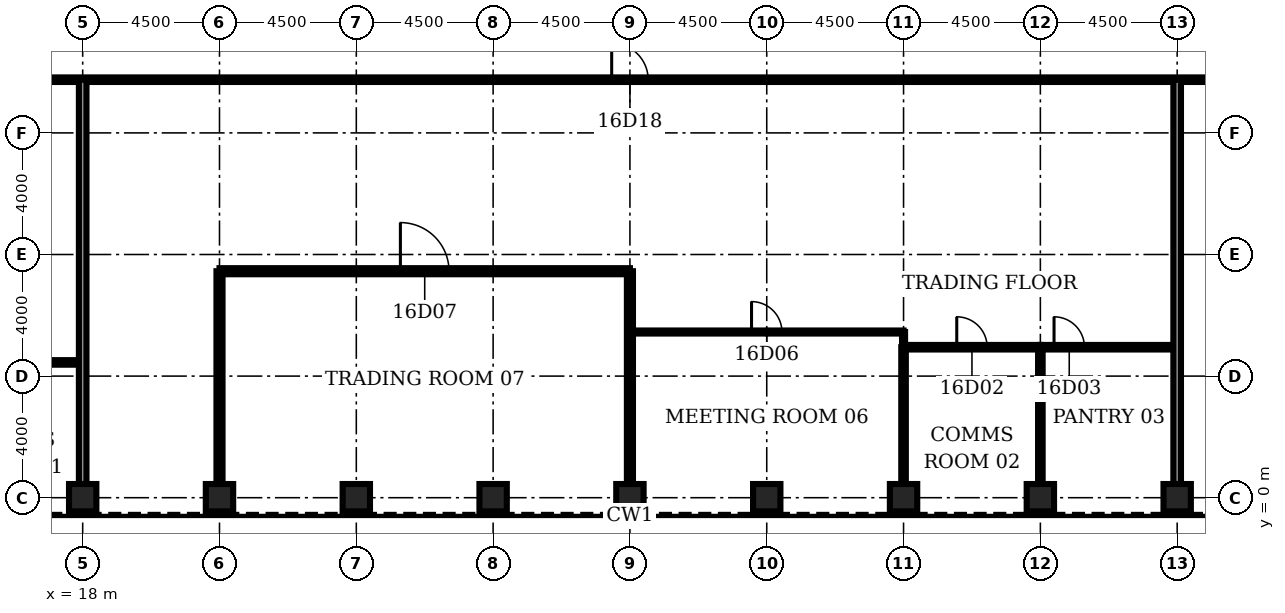
"""IFC4 building model, lengths in metres.
Left out: names, types, materials, properties, quantities, classifications, styles, units other than length and angle.
Written with IfcOpenShell. Run it as: python <this file> out.ifc"""

import sys

from ifc_helpers import new_model, si_unit, direction, frame, frame_2d, origin, origin_2d, place, context, subcontext, project, spatial, rectangle, hollow_rectangle, extrude, element, fill, save


model = new_model("IFC4")
c1 = context("Model", 3, precision=1e-05, world=origin(), true_north=direction((0.0, 1.0)))
c2 = subcontext(c1, "Body", "Model", "MODEL_VIEW")
j1 = project(units=[si_unit("LENGTHUNIT", "METRE"), si_unit("PLANEANGLEUNIT", "RADIAN")], contexts=[c1])
p1 = place(None, origin())
s1 = spatial("IfcSite", under=j1, at=p1, CompositionType="ELEMENT")
p2 = place(p1, origin())
s2 = spatial("IfcBuilding", under=s1, at=p2, CompositionType="ELEMENT")
p3 = place(p2, frame((0.0, 0.0, 77.0)))
s3 = spatial("IfcBuildingStorey", under=s2, at=p3, CompositionType="ELEMENT", Elevation=77.0)
for number, where, z_axis, x_axis in (
    (1, (18.0, 0.0, 0.0), (0.0, 0.0, 1.0), (0.0, 1.0, 0.0)),
    (2, (22.5, 0.0, 0.0), (0.0, 0.0, 1.0), (0.0, 1.0, 0.0)),
    (3, (27.0, 0.0, 0.0), (0.0, 0.0, 1.0), (0.0, 1.0, 0.0)),
    (4, (31.5, 0.0, 0.0), (0.0, 0.0, 1.0), (0.0, 1.0, 0.0)),
    (5, (36.0, 0.0, 0.0), (0.0, 0.0, 1.0), (0.0, 1.0, 0.0)),
    (6, (40.5, 0.0, 0.0), (0.0, 0.0, 1.0), (0.0, 1.0, 0.0)),
    (7, (45.0, 0.0, 0.0), (0.0, 0.0, 1.0), (0.0, 1.0, 0.0)),
    (8, (49.5, 0.0, 0.0), (0.0, 0.0, 1.0), (0.0, 1.0, 0.0)),
    (9, (54.0, 0.0, 0.0), (0.0, 0.0, 1.0), (0.0, 1.0, 0.0)),
):
    element("IfcColumn", number, at=place(p3, frame(where, z_axis=z_axis, x_axis=x_axis)), inside=s3, PredefinedType="COLUMN", context=c2, shape_type="SweptSolid", body=[
        extrude(hollow_rectangle(XDim=0.9, YDim=0.9, WallThickness=0.11, at=origin_2d()), origin(), (0.0, 0.0, 1.0), 4.5),
    ])
p4 = place(p3, frame((13.5, 4.45, 0.0), z_axis=(0.0, 0.0, 1.0), x_axis=(1.0, 0.0, 0.0)))
e10 = element("IfcWall", 10, at=p4, inside=s3, PredefinedType="PARTITIONING", context=c2, shape_type="SweptSolid", body=[
    extrude(rectangle(XDim=4.5, YDim=0.15, at=frame_2d((2.25, 0.0))), origin(), (0.0, 0.0, 1.0), 3.0),
])
p5 = place(p4, frame((1.75, 0.0, 0.0)))
e11 = element("IfcOpeningElement", 11, at=p5, cuts=e10, PredefinedType="OPENING", context=c2, shape_type="SweptSolid", body=[
    extrude(rectangle(XDim=1.0, YDim=2.1, at=frame_2d((0.5, 1.05))), frame((0.0, 0.085, 0.0), z_axis=(0.0, -1.0, 0.0), x_axis=(1.0, 0.0, 0.0)), (0.0, 0.0, 1.0), 0.17),
])
p6 = place(p3, frame((45.0, 4.95, 0.0), z_axis=(0.0, 0.0, 1.0), x_axis=(1.0, 0.0, 0.0)))
e12 = element("IfcWall", 12, at=p6, inside=s3, PredefinedType="PARTITIONING", context=c2, shape_type="SweptSolid", body=[
    extrude(rectangle(XDim=4.5, YDim=0.15, at=frame_2d((2.25, 0.0))), origin(), (0.0, 0.0, 1.0), 3.0),
])
p7 = place(p6, frame((1.75, 0.0, 0.0)))
e13 = element("IfcOpeningElement", 13, at=p7, cuts=e12, PredefinedType="OPENING", context=c2, shape_type="SweptSolid", body=[
    extrude(rectangle(XDim=1.0, YDim=2.1, at=frame_2d((0.5, 1.05))), frame((0.0, 0.085, 0.0), z_axis=(0.0, -1.0, 0.0), x_axis=(1.0, 0.0, 0.0)), (0.0, 0.0, 1.0), 0.17),
])
p8 = place(p3, frame((49.5, 4.95, 0.0), z_axis=(0.0, 0.0, 1.0), x_axis=(1.0, 0.0, 0.0)))
e14 = element("IfcWall", 14, at=p8, inside=s3, PredefinedType="PARTITIONING", context=c2, shape_type="SweptSolid", body=[
    extrude(rectangle(XDim=4.5, YDim=0.15, at=frame_2d((2.25, 0.0))), origin(), (0.0, 0.0, 1.0), 3.0),
])
p9 = place(p8, frame((0.45, 0.0, 0.0)))
e15 = element("IfcOpeningElement", 15, at=p9, cuts=e14, PredefinedType="OPENING", context=c2, shape_type="SweptSolid", body=[
    extrude(rectangle(XDim=1.0, YDim=2.1, at=frame_2d((0.5, 1.05))), frame((0.0, 0.085, 0.0), z_axis=(0.0, -1.0, 0.0), x_axis=(1.0, 0.0, 0.0)), (0.0, 0.0, 1.0), 0.17),
])
p10 = place(p3, frame((36.0, 5.45, 0.0), z_axis=(0.0, 0.0, 1.0), x_axis=(1.0, 0.0, 0.0)))
e16 = element("IfcWall", 16, at=p10, inside=s3, PredefinedType="PARTITIONING", context=c2, shape_type="SweptSolid", body=[
    extrude(rectangle(XDim=9.0, YDim=0.1, at=frame_2d((4.5, 0.0))), origin(), (0.0, 0.0, 1.0), 3.0),
])
p11 = place(p10, frame((4.0, 0.0, 0.0)))
e17 = element("IfcOpeningElement", 17, at=p11, cuts=e16, PredefinedType="OPENING", context=c2, shape_type="SweptSolid", body=[
    extrude(rectangle(XDim=1.0, YDim=2.1, at=frame_2d((0.5, 1.05))), frame((0.0, 0.06, 0.0), z_axis=(0.0, -1.0, 0.0), x_axis=(1.0, 0.0, 0.0)), (0.0, 0.0, 1.0), 0.12),
])
p12 = place(p3, frame((22.5, 7.45, 0.0), z_axis=(0.0, 0.0, 1.0), x_axis=(1.0, 0.0, 0.0)))
e18 = element("IfcWall", 18, at=p12, inside=s3, PredefinedType="PARTITIONING", context=c2, shape_type="SweptSolid", body=[
    extrude(rectangle(XDim=13.5, YDim=0.2, at=frame_2d((6.75, 0.0))), origin(), (0.0, 0.0, 1.0), 3.0),
])
p13 = place(p12, frame((5.95, 0.0, 0.0)))
e19 = element("IfcOpeningElement", 19, at=p13, cuts=e18, PredefinedType="OPENING", context=c2, shape_type="SweptSolid", body=[
    extrude(rectangle(XDim=1.6, YDim=2.1, at=frame_2d((0.8, 1.05))), frame((0.0, 0.11, 0.0), z_axis=(0.0, -1.0, 0.0), x_axis=(1.0, 0.0, 0.0)), (0.0, 0.0, 1.0), 0.22),
])
p14 = place(p3, frame((15.15, 13.75, 0.0), z_axis=(0.0, 0.0, 1.0), x_axis=(1.0, 0.0, 0.0)))
e20 = element("IfcWall", 20, at=p14, inside=s3, PredefinedType="PARTITIONING", context=c2, shape_type="SweptSolid", body=[
    extrude(rectangle(XDim=41.7, YDim=0.15, at=frame_2d((20.85, 0.0))), origin(), (0.0, 0.0, 1.0), 3.0),
])
p15 = place(p14, frame((20.25, 0.0, 0.0)))
e21 = element("IfcOpeningElement", 21, at=p15, cuts=e20, PredefinedType="OPENING", context=c2, shape_type="SweptSolid", body=[
    extrude(rectangle(XDim=1.2, YDim=2.1, at=frame_2d((0.6, 1.05))), frame((0.0, 0.085, 0.0), z_axis=(0.0, -1.0, 0.0), x_axis=(1.0, 0.0, 0.0)), (0.0, 0.0, 1.0), 0.17),
])
p16 = place(p3, frame((18.0, 0.45, 0.0), z_axis=(0.0, 0.0, 1.0), x_axis=(0.0, 1.0, 0.0)))
e22 = element("IfcWall", 22, at=p16, inside=s3, PredefinedType="PARTITIONING", context=c2, shape_type="SweptSolid", body=[
    extrude(rectangle(XDim=13.3, YDim=0.25, at=frame_2d((6.65, 0.0))), origin(), (0.0, 0.0, 1.0), 3.0),
])
for number, where, z_axis, x_axis in (
    (23, (22.5, 0.45, 0.0), (0.0, 0.0, 1.0), (0.0, 1.0, 0.0)),
    (24, (36.0, 0.45, 0.0), (0.0, 0.0, 1.0), (0.0, 1.0, 0.0)),
):
    element("IfcWall", number, at=place(p3, frame(where, z_axis=z_axis, x_axis=x_axis)), inside=s3, PredefinedType="PARTITIONING", context=c2, shape_type="SweptSolid", body=[
        extrude(rectangle(XDim=7.0, YDim=0.2, at=frame_2d((3.5, 0.0))), origin(), (0.0, 0.0, 1.0), 3.0),
    ])
p17 = place(p3, frame((45.0, 0.45, 0.0), z_axis=(0.0, 0.0, 1.0), x_axis=(0.0, 1.0, 0.0)))
e25 = element("IfcWall", 25, at=p17, inside=s3, PredefinedType="PARTITIONING", context=c2, shape_type="SweptSolid", body=[
    extrude(rectangle(XDim=4.5, YDim=0.15, at=frame_2d((2.25, 0.0))), origin(), (0.0, 0.0, 1.0), 3.0),
])
p18 = place(p3, frame((45.0, 4.95, 0.0), z_axis=(0.0, 0.0, 1.0), x_axis=(0.0, 1.0, 0.0)))
e26 = element("IfcWall", 26, at=p18, inside=s3, PredefinedType="PARTITIONING", context=c2, shape_type="SweptSolid", body=[
    extrude(rectangle(XDim=0.5, YDim=0.1, at=frame_2d((0.25, 0.0))), origin(), (0.0, 0.0, 1.0), 3.0),
])
p19 = place(p3, frame((49.5, 0.45, 0.0), z_axis=(0.0, 0.0, 1.0), x_axis=(0.0, 1.0, 0.0)))
e27 = element("IfcWall", 27, at=p19, inside=s3, PredefinedType="PARTITIONING", context=c2, shape_type="SweptSolid", body=[
    extrude(rectangle(XDim=4.5, YDim=0.15, at=frame_2d((2.25, 0.0))), origin(), (0.0, 0.0, 1.0), 3.0),
])
p20 = place(p3, frame((54.0, 0.45, 0.0), z_axis=(0.0, 0.0, 1.0), x_axis=(0.0, 1.0, 0.0)))
e28 = element("IfcWall", 28, at=p20, inside=s3, PredefinedType="PARTITIONING", context=c2, shape_type="SweptSolid", body=[
    extrude(rectangle(XDim=13.3, YDim=0.25, at=frame_2d((6.65, 0.0))), origin(), (0.0, 0.0, 1.0), 3.0),
])
p21 = place(p7, origin())
e29 = element("IfcDoor", 29, at=p21, inside=s3, OperationType="SINGLE_SWING_LEFT", PredefinedType="DOOR", context=c2, shape_type="SweptSolid", body=[
    extrude(rectangle(XDim=1.0, YDim=2.1, at=frame_2d((0.5, 1.05))), frame((0.0, 0.025, 0.0), z_axis=(0.0, -1.0, 0.0), x_axis=(1.0, 0.0, 0.0)), (0.0, 0.0, 1.0), 0.05),
])
fill(e13, e29)
p22 = place(p9, origin())
e30 = element("IfcDoor", 30, at=p22, inside=s3, OperationType="SINGLE_SWING_LEFT", PredefinedType="DOOR", context=c2, shape_type="SweptSolid", body=[
    extrude(rectangle(XDim=1.0, YDim=2.1, at=frame_2d((0.5, 1.05))), frame((0.0, 0.025, 0.0), z_axis=(0.0, -1.0, 0.0), x_axis=(1.0, 0.0, 0.0)), (0.0, 0.0, 1.0), 0.05),
])
fill(e15, e30)
p23 = place(p11, origin())
e31 = element("IfcDoor", 31, at=p23, inside=s3, OperationType="SINGLE_SWING_LEFT", PredefinedType="DOOR", context=c2, shape_type="SweptSolid", body=[
    extrude(rectangle(XDim=1.0, YDim=2.1, at=frame_2d((0.5, 1.05))), frame((0.0, 0.025, 0.0), z_axis=(0.0, -1.0, 0.0), x_axis=(1.0, 0.0, 0.0)), (0.0, 0.0, 1.0), 0.05),
])
fill(e17, e31)
p24 = place(p13, origin())
e32 = element("IfcDoor", 32, at=p24, inside=s3, OperationType="SINGLE_SWING_LEFT", PredefinedType="DOOR", context=c2, shape_type="SweptSolid", body=[
    extrude(rectangle(XDim=1.6, YDim=2.1, at=frame_2d((0.8, 1.05))), frame((0.0, 0.025, 0.0), z_axis=(0.0, -1.0, 0.0), x_axis=(1.0, 0.0, 0.0)), (0.0, 0.0, 1.0), 0.05),
])
fill(e19, e32)
p25 = place(p15, origin())
e33 = element("IfcDoor", 33, at=p25, inside=s3, OperationType="SINGLE_SWING_LEFT", PredefinedType="DOOR", context=c2, shape_type="SweptSolid", body=[
    extrude(rectangle(XDim=1.2, YDim=2.1, at=frame_2d((0.6, 1.05))), frame((0.0, 0.025, 0.0), z_axis=(0.0, -1.0, 0.0), x_axis=(1.0, 0.0, 0.0)), (0.0, 0.0, 1.0), 0.05),
])
fill(e21, e33)
save(model, sys.argv[1])
